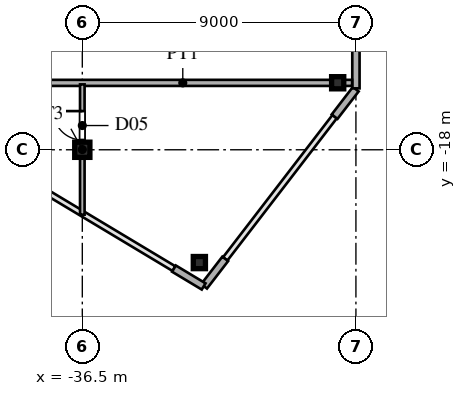
"""IFC4 building model, lengths in metres.
Left out: names, types, materials, properties, quantities, classifications, styles, units other than length and angle.
Written with IfcOpenShell. Run it as: python <this file> out.ifc"""

import sys

from ifc_helpers import new_model, si_unit, direction, frame, frame_2d, origin, origin_2d, place, context, subcontext, project, spatial, rectangle, hollow_rectangle, i_section, extrude, source, transform, mapped, element, fill, save


model = new_model("IFC4")
c1 = context("Model", 3, precision=1e-05, world=origin(), true_north=direction((0.0, 1.0)))
c2 = subcontext(c1, "Body", "Model", "MODEL_VIEW")
j1 = project(units=[si_unit("LENGTHUNIT", "METRE"), si_unit("PLANEANGLEUNIT", "RADIAN")], contexts=[c1])
p1 = place(None, origin())
s1 = spatial("IfcSite", under=j1, at=p1, CompositionType="ELEMENT")
p2 = place(p1, origin())
s2 = spatial("IfcBuilding", under=s1, at=p2, CompositionType="ELEMENT")
p3 = place(p2, frame((0.0, 0.0, 199.5)))
s3 = spatial("IfcBuildingStorey", under=s2, at=p3, CompositionType="ELEMENT", Elevation=199.5)
m1 = source(origin(), c2, "Body", "SweptSolid", [
    extrude(i_section(OverallWidth=0.5, OverallDepth=0.5, WebThickness=0.02, FlangeThickness=0.032, at=origin_2d()), origin(), (0.0, 0.0, 1.0), 3.6),
])
p4 = place(p3, frame((-36.5, -18.0, 0.0), z_axis=(0.0, 0.0, 1.0), x_axis=(1.0, 0.0, 0.0)))
e1 = element("IfcColumn", 1, at=p4, inside=s3, PredefinedType="COLUMN", context=c2, shape_type="MappedRepresentation", body=[
    mapped(m1, transform((0.0, 0.0, 0.0), scale=1.0)),
])
m2 = source(origin(), c2, "Body", "SweptSolid", [
    extrude(hollow_rectangle(XDim=0.4, YDim=0.4, WallThickness=0.016, at=origin_2d()), origin(), (0.0, 0.0, 1.0), 3.6),
])
for number, where, z_axis, x_axis in (
    (2, (-28.1, -15.796, 0.0), (0.0, 0.0, 1.0), (1.0, 0.0, 0.0)),
    (3, (-32.65, -21.71, 0.0), (0.0, 0.0, 1.0), (1.0, 0.0, 0.0)),
):
    element("IfcColumn", number, at=place(p3, frame(where, z_axis=z_axis, x_axis=x_axis)), inside=s3, PredefinedType="COLUMN", context=c2, shape_type="MappedRepresentation", body=[
        mapped(m2, transform((0.0, 0.0, 0.0), scale=1.0)),
    ])
p5 = place(p3, frame((-27.5, -15.98, 0.0), z_axis=(0.0, 0.0, 1.0), x_axis=(0.0, 1.0, 0.0)))
e4 = element("IfcWall", 4, at=p5, inside=s3, PredefinedType="SOLIDWALL", context=c2, shape_type="SweptSolid", body=[
    extrude(rectangle(XDim=1.6, YDim=0.24, at=frame_2d((0.8, 0.0))), origin(), (0.0, 0.0, 1.0), 3.38),
])
for number, where, z_axis, x_axis in (
    (5, (-33.486, -21.908, 0.0), (0.0, 0.0, 1.0), (0.857, -0.515, 0.0)),
    (6, (-32.494, -22.492, 0.0), (0.0, 0.0, 1.0), (0.61, 0.793, 0.0)),
    (7, (-28.201, -16.912, 0.0), (0.0, 0.0, 1.0), (0.61, 0.793, 0.0)),
):
    element("IfcWall", number, at=place(p3, frame(where, z_axis=z_axis, x_axis=x_axis)), inside=s3, PredefinedType="SOLIDWALL", context=c2, shape_type="SweptSolid", body=[
        extrude(rectangle(XDim=1.14, YDim=0.24, at=frame_2d((0.57, 0.0))), origin(), (0.0, 0.0, 1.0), 3.38),
    ])
p6 = place(p3, frame((-38.765, -15.8, 0.0), z_axis=(0.0, 0.0, 1.0), x_axis=(1.0, 0.0, 0.0)))
e8 = element("IfcWall", 8, at=p6, inside=s3, PredefinedType="PARTITIONING", context=c2, shape_type="SweptSolid", body=[
    extrude(rectangle(XDim=11.14, YDim=0.2, at=frame_2d((5.57, 0.0))), origin(), (0.0, 0.0, 1.0), 3.38),
])
p7 = place(p3, frame((-36.5, -20.135, 0.0), z_axis=(0.0, 0.0, 1.0), x_axis=(0.0, 1.0, 0.0)))
e9 = element("IfcWall", 9, at=p7, inside=s3, PredefinedType="PARTITIONING", context=c2, shape_type="SweptSolid", body=[
    extrude(rectangle(XDim=4.285, YDim=0.15, at=frame_2d((2.143, 0.0))), origin(), (0.0, 0.0, 1.0), 2.78),
])
p8 = place(p7, frame((2.457, 0.0, 0.0)))
e10 = element("IfcOpeningElement", 10, at=p8, cuts=e9, PredefinedType="OPENING", context=c2, shape_type="SweptSolid", body=[
    extrude(rectangle(XDim=0.95, YDim=2.15, at=frame_2d((0.475, 1.075))), frame((0.0, 0.085, 0.0), z_axis=(0.0, -1.0, 0.0), x_axis=(1.0, 0.0, 0.0)), (0.0, 0.0, 1.0), 0.17),
])
m3 = source(origin(), c2, "Body", "SweptSolid", [
    extrude(rectangle(XDim=0.95, YDim=2.15, at=frame_2d((0.475, 1.075))), frame((0.0, 0.025, 0.0), z_axis=(0.0, -1.0, 0.0), x_axis=(1.0, 0.0, 0.0)), (0.0, 0.0, 1.0), 0.05),
])
p9 = place(p8, origin())
e11 = element("IfcDoor", 11, at=p9, inside=s3, OperationType="SINGLE_SWING_RIGHT", PredefinedType="DOOR", context=c2, shape_type="MappedRepresentation", body=[
    mapped(m3, transform((0.0, 0.0, 0.0), scale=1.0)),
])
fill(e10, e11)
save(model, sys.argv[1])
